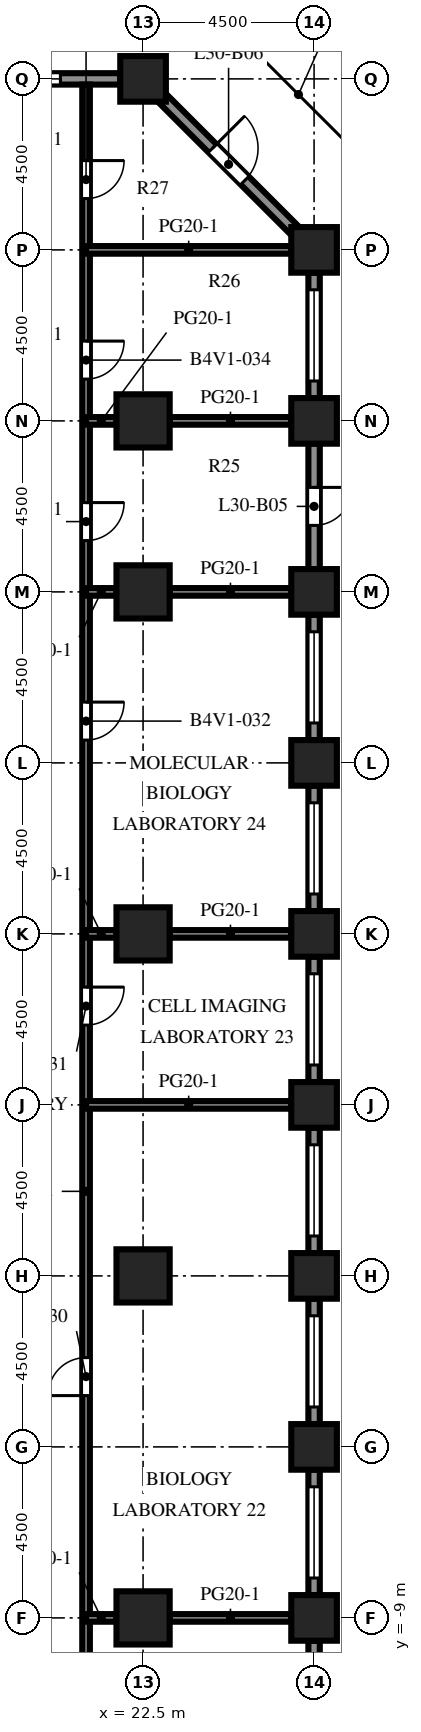
"""IFC4 building model, lengths in metres.
Left out: names, types, materials, properties, quantities, classifications, styles, units other than length and angle.
Written with IfcOpenShell. Run it as: python <this file> out.ifc"""

import sys

from ifc_helpers import new_model, si_unit, direction, frame, frame_2d, origin, origin_2d, place, context, subcontext, project, spatial, rectangle, extrude, element, fill, save


model = new_model("IFC4")
c1 = context("Model", 3, precision=1e-05, world=origin(), true_north=direction((0.0, 1.0)))
c2 = subcontext(c1, "Body", "Model", "MODEL_VIEW")
j1 = project(units=[si_unit("LENGTHUNIT", "METRE"), si_unit("PLANEANGLEUNIT", "RADIAN")], contexts=[c1])
p1 = place(None, origin())
s1 = spatial("IfcSite", under=j1, at=p1, CompositionType="ELEMENT")
p2 = place(p1, origin())
s2 = spatial("IfcBuilding", under=s1, at=p2, CompositionType="ELEMENT")
p3 = place(p2, frame((0.0, 0.0, 133.1)))
s3 = spatial("IfcBuildingStorey", under=s2, at=p3, CompositionType="ELEMENT", Elevation=133.1)
for number, where, z_axis, x_axis in (
    (1, (22.5, 31.5, 0.0), (0.0, 0.0, 1.0), (1.0, 0.0, 0.0)),
    (2, (27.0, -9.0, 0.0), (0.0, 0.0, 1.0), (1.0, 0.0, 0.0)),
    (3, (27.0, -4.5, 0.0), (0.0, 0.0, 1.0), (1.0, 0.0, 0.0)),
    (4, (27.0, 0.0, 0.0), (0.0, 0.0, 1.0), (1.0, 0.0, 0.0)),
    (5, (27.0, 4.5, 0.0), (0.0, 0.0, 1.0), (1.0, 0.0, 0.0)),
    (6, (27.0, 9.0, 0.0), (0.0, 0.0, 1.0), (1.0, 0.0, 0.0)),
    (7, (27.0, 13.5, 0.0), (0.0, 0.0, 1.0), (1.0, 0.0, 0.0)),
    (8, (27.0, 18.0, 0.0), (0.0, 0.0, 1.0), (1.0, 0.0, 0.0)),
    (9, (27.0, 22.5, 0.0), (0.0, 0.0, 1.0), (1.0, 0.0, 0.0)),
    (10, (27.0, 27.0, 0.0), (0.0, 0.0, 1.0), (1.0, 0.0, 0.0)),
):
    element("IfcColumn", number, at=place(p3, frame(where, z_axis=z_axis, x_axis=x_axis)), inside=s3, PredefinedType="COLUMN", context=c2, shape_type="SweptSolid", body=[
        extrude(rectangle(XDim=1.2, YDim=1.2, at=origin_2d()), origin(), (0.0, 0.0, 1.0), 4.1),
    ])
for number, where, z_axis, x_axis in (
    (11, (22.5, -9.0, 0.0), (0.0, 0.0, 1.0), (1.0, 0.0, 0.0)),
    (12, (22.5, 0.0, 0.0), (0.0, 0.0, 1.0), (1.0, 0.0, 0.0)),
    (13, (22.5, 9.0, 0.0), (0.0, 0.0, 1.0), (1.0, 0.0, 0.0)),
    (14, (22.5, 18.0, 0.0), (0.0, 0.0, 1.0), (1.0, 0.0, 0.0)),
    (15, (22.5, 22.5, 0.0), (0.0, 0.0, 1.0), (1.0, 0.0, 0.0)),
):
    element("IfcColumn", number, at=place(p3, frame(where, z_axis=z_axis, x_axis=x_axis)), inside=s3, PredefinedType="COLUMN", context=c2, shape_type="SweptSolid", body=[
        extrude(rectangle(XDim=1.4, YDim=1.4, at=origin_2d()), origin(), (0.0, 0.0, 1.0), 4.1),
    ])
p4 = place(p3, frame((27.0, -9.6, 0.0), z_axis=(0.0, 0.0, 1.0), x_axis=(0.0, -1.0, 0.0)))
e16 = element("IfcWall", 16, at=p4, inside=s3, PredefinedType="SOLIDWALL", context=c2, shape_type="SweptSolid", body=[
    extrude(rectangle(XDim=3.3, YDim=0.3, at=frame_2d((1.65, 0.0))), origin(), (0.0, 0.0, 1.0), 2.75),
])
p5 = place(p4, frame((1.15, 0.0, 0.0)))
e17 = element("IfcOpeningElement", 17, at=p5, cuts=e16, PredefinedType="OPENING", context=c2, shape_type="SweptSolid", body=[
    extrude(rectangle(XDim=1.0, YDim=2.2, at=frame_2d((0.5, 1.1))), frame((0.0, 0.16, 0.0), z_axis=(0.0, -1.0, 0.0), x_axis=(1.0, 0.0, 0.0)), (0.0, 0.0, 1.0), 0.32),
])
p6 = place(p3, frame((27.0, -5.1, 0.0), z_axis=(0.0, 0.0, 1.0), x_axis=(0.0, -1.0, 0.0)))
e18 = element("IfcWall", 18, at=p6, inside=s3, PredefinedType="SOLIDWALL", context=c2, shape_type="SweptSolid", body=[
    extrude(rectangle(XDim=3.3, YDim=0.3, at=frame_2d((1.65, 0.0))), origin(), (0.0, 0.0, 1.0), 2.75),
])
p7 = place(p6, frame((0.45, 0.0, 0.8)))
e19 = element("IfcOpeningElement", 19, at=p7, cuts=e18, PredefinedType="OPENING", context=c2, shape_type="SweptSolid", body=[
    extrude(rectangle(XDim=2.4, YDim=1.7, at=frame_2d((1.2, 0.85))), frame((0.0, 0.16, 0.0), z_axis=(0.0, -1.0, 0.0), x_axis=(1.0, 0.0, 0.0)), (0.0, 0.0, 1.0), 0.32),
])
p8 = place(p3, frame((27.0, -0.6, 0.0), z_axis=(0.0, 0.0, 1.0), x_axis=(0.0, -1.0, 0.0)))
e20 = element("IfcWall", 20, at=p8, inside=s3, PredefinedType="SOLIDWALL", context=c2, shape_type="SweptSolid", body=[
    extrude(rectangle(XDim=3.3, YDim=0.3, at=frame_2d((1.65, 0.0))), origin(), (0.0, 0.0, 1.0), 2.75),
])
p9 = place(p8, frame((0.45, 0.0, 0.8)))
e21 = element("IfcOpeningElement", 21, at=p9, cuts=e20, PredefinedType="OPENING", context=c2, shape_type="SweptSolid", body=[
    extrude(rectangle(XDim=2.4, YDim=1.7, at=frame_2d((1.2, 0.85))), frame((0.0, 0.16, 0.0), z_axis=(0.0, -1.0, 0.0), x_axis=(1.0, 0.0, 0.0)), (0.0, 0.0, 1.0), 0.32),
])
p10 = place(p3, frame((27.0, 3.9, 0.0), z_axis=(0.0, 0.0, 1.0), x_axis=(0.0, -1.0, 0.0)))
e22 = element("IfcWall", 22, at=p10, inside=s3, PredefinedType="SOLIDWALL", context=c2, shape_type="SweptSolid", body=[
    extrude(rectangle(XDim=3.3, YDim=0.3, at=frame_2d((1.65, 0.0))), origin(), (0.0, 0.0, 1.0), 2.75),
])
p11 = place(p10, frame((0.45, 0.0, 0.8)))
e23 = element("IfcOpeningElement", 23, at=p11, cuts=e22, PredefinedType="OPENING", context=c2, shape_type="SweptSolid", body=[
    extrude(rectangle(XDim=2.4, YDim=1.7, at=frame_2d((1.2, 0.85))), frame((0.0, 0.16, 0.0), z_axis=(0.0, -1.0, 0.0), x_axis=(1.0, 0.0, 0.0)), (0.0, 0.0, 1.0), 0.32),
])
p12 = place(p3, frame((27.0, 8.4, 0.0), z_axis=(0.0, 0.0, 1.0), x_axis=(0.0, -1.0, 0.0)))
e24 = element("IfcWall", 24, at=p12, inside=s3, PredefinedType="SOLIDWALL", context=c2, shape_type="SweptSolid", body=[
    extrude(rectangle(XDim=3.3, YDim=0.3, at=frame_2d((1.65, 0.0))), origin(), (0.0, 0.0, 1.0), 2.75),
])
p13 = place(p12, frame((0.45, 0.0, 0.8)))
e25 = element("IfcOpeningElement", 25, at=p13, cuts=e24, PredefinedType="OPENING", context=c2, shape_type="SweptSolid", body=[
    extrude(rectangle(XDim=2.4, YDim=1.7, at=frame_2d((1.2, 0.85))), frame((0.0, 0.16, 0.0), z_axis=(0.0, -1.0, 0.0), x_axis=(1.0, 0.0, 0.0)), (0.0, 0.0, 1.0), 0.32),
])
p14 = place(p3, frame((27.0, 12.9, 0.0), z_axis=(0.0, 0.0, 1.0), x_axis=(0.0, -1.0, 0.0)))
e26 = element("IfcWall", 26, at=p14, inside=s3, PredefinedType="SOLIDWALL", context=c2, shape_type="SweptSolid", body=[
    extrude(rectangle(XDim=3.3, YDim=0.3, at=frame_2d((1.65, 0.0))), origin(), (0.0, 0.0, 1.0), 2.75),
])
p15 = place(p14, frame((0.45, 0.0, 0.8)))
e27 = element("IfcOpeningElement", 27, at=p15, cuts=e26, PredefinedType="OPENING", context=c2, shape_type="SweptSolid", body=[
    extrude(rectangle(XDim=2.4, YDim=1.7, at=frame_2d((1.2, 0.85))), frame((0.0, 0.16, 0.0), z_axis=(0.0, -1.0, 0.0), x_axis=(1.0, 0.0, 0.0)), (0.0, 0.0, 1.0), 0.32),
])
p16 = place(p3, frame((27.0, 17.4, 0.0), z_axis=(0.0, 0.0, 1.0), x_axis=(0.0, -1.0, 0.0)))
e28 = element("IfcWall", 28, at=p16, inside=s3, PredefinedType="SOLIDWALL", context=c2, shape_type="SweptSolid", body=[
    extrude(rectangle(XDim=3.3, YDim=0.3, at=frame_2d((1.65, 0.0))), origin(), (0.0, 0.0, 1.0), 2.75),
])
p17 = place(p16, frame((0.45, 0.0, 0.8)))
e29 = element("IfcOpeningElement", 29, at=p17, cuts=e28, PredefinedType="OPENING", context=c2, shape_type="SweptSolid", body=[
    extrude(rectangle(XDim=2.4, YDim=1.7, at=frame_2d((1.2, 0.85))), frame((0.0, 0.16, 0.0), z_axis=(0.0, -1.0, 0.0), x_axis=(1.0, 0.0, 0.0)), (0.0, 0.0, 1.0), 0.32),
])
p18 = place(p3, frame((27.0, 21.9, 0.0), z_axis=(0.0, 0.0, 1.0), x_axis=(0.0, -1.0, 0.0)))
e30 = element("IfcWall", 30, at=p18, inside=s3, PredefinedType="SOLIDWALL", context=c2, shape_type="SweptSolid", body=[
    extrude(rectangle(XDim=3.3, YDim=0.3, at=frame_2d((1.65, 0.0))), origin(), (0.0, 0.0, 1.0), 2.75),
])
p19 = place(p18, frame((1.15, 0.0, 0.0)))
e31 = element("IfcOpeningElement", 31, at=p19, cuts=e30, PredefinedType="OPENING", context=c2, shape_type="SweptSolid", body=[
    extrude(rectangle(XDim=1.0, YDim=2.2, at=frame_2d((0.5, 1.1))), frame((0.0, 0.16, 0.0), z_axis=(0.0, -1.0, 0.0), x_axis=(1.0, 0.0, 0.0)), (0.0, 0.0, 1.0), 0.32),
])
p20 = place(p3, frame((27.0, 26.4, 0.0), z_axis=(0.0, 0.0, 1.0), x_axis=(0.0, -1.0, 0.0)))
e32 = element("IfcWall", 32, at=p20, inside=s3, PredefinedType="SOLIDWALL", context=c2, shape_type="SweptSolid", body=[
    extrude(rectangle(XDim=3.3, YDim=0.3, at=frame_2d((1.65, 0.0))), origin(), (0.0, 0.0, 1.0), 2.75),
])
p21 = place(p20, frame((0.45, 0.0, 0.8)))
e33 = element("IfcOpeningElement", 33, at=p21, cuts=e32, PredefinedType="OPENING", context=c2, shape_type="SweptSolid", body=[
    extrude(rectangle(XDim=2.4, YDim=1.7, at=frame_2d((1.2, 0.85))), frame((0.0, 0.16, 0.0), z_axis=(0.0, -1.0, 0.0), x_axis=(1.0, 0.0, 0.0)), (0.0, 0.0, 1.0), 0.32),
])
p22 = place(p3, frame((22.994, 31.006, 0.0), z_axis=(0.0, 0.0, 1.0), x_axis=(0.707106781187, -0.707106781187, 0.0)))
e34 = element("IfcWall", 34, at=p22, inside=s3, PredefinedType="SOLIDWALL", context=c2, shape_type="SweptSolid", body=[
    extrude(rectangle(XDim=4.967, YDim=0.3, at=frame_2d((2.483, 0.0))), origin(), (0.0, 0.0, 1.0), 2.75),
])
p23 = place(p22, frame((1.884, 0.0, 0.0)))
e35 = element("IfcOpeningElement", 35, at=p23, cuts=e34, PredefinedType="OPENING", context=c2, shape_type="SweptSolid", body=[
    extrude(rectangle(XDim=1.2, YDim=2.2, at=frame_2d((0.6, 1.1))), frame((0.0, 0.16, 0.0), z_axis=(0.0, -1.0, 0.0), x_axis=(1.0, 0.0, 0.0)), (0.0, 0.0, 1.0), 0.32),
])
p24 = place(p3, frame((18.6, 31.5, 0.0), z_axis=(0.0, 0.0, 1.0), x_axis=(1.0, 0.0, 0.0)))
e36 = element("IfcWall", 36, at=p24, inside=s3, PredefinedType="SOLIDWALL", context=c2, shape_type="SweptSolid", body=[
    extrude(rectangle(XDim=3.3, YDim=0.3, at=frame_2d((1.65, 0.0))), origin(), (0.0, 0.0, 1.0), 2.75),
])
p25 = place(p24, frame((0.525, 0.0, 0.8)))
e37 = element("IfcOpeningElement", 37, at=p25, cuts=e36, PredefinedType="OPENING", context=c2, shape_type="SweptSolid", body=[
    extrude(rectangle(XDim=1.2, YDim=1.7, at=frame_2d((0.6, 0.85))), frame((0.0, 0.16, 0.0), z_axis=(0.0, -1.0, 0.0), x_axis=(1.0, 0.0, 0.0)), (0.0, 0.0, 1.0), 0.32),
])
p26 = place(p3, frame((21.0, 31.35, 0.0), z_axis=(0.0, 0.0, 1.0), x_axis=(0.0, -1.0, 0.0)))
e38 = element("IfcWall", 38, at=p26, inside=s3, PredefinedType="PARTITIONING", context=c2, shape_type="SweptSolid", body=[
    extrude(rectangle(XDim=53.7, YDim=0.2, at=frame_2d((26.85, 0.0))), origin(), (0.0, 0.0, 1.0), 3.65),
])
p27 = place(p26, frame((47.5, 0.0, 0.0)))
e39 = element("IfcOpeningElement", 39, at=p27, cuts=e38, PredefinedType="OPENING", context=c2, shape_type="SweptSolid", body=[
    extrude(rectangle(XDim=1.0, YDim=2.1, at=frame_2d((0.5, 1.05))), frame((0.0, 0.11, 0.0), z_axis=(0.0, -1.0, 0.0), x_axis=(1.0, 0.0, 0.0)), (0.0, 0.0, 1.0), 0.22),
])
p28 = place(p26, frame((41.5, 0.0, 0.0)))
e40 = element("IfcOpeningElement", 40, at=p28, cuts=e38, PredefinedType="OPENING", context=c2, shape_type="SweptSolid", body=[
    extrude(rectangle(XDim=1.0, YDim=2.1, at=frame_2d((0.5, 1.05))), frame((0.0, 0.11, 0.0), z_axis=(0.0, -1.0, 0.0), x_axis=(1.0, 0.0, 0.0)), (0.0, 0.0, 1.0), 0.22),
])
p29 = place(p26, frame((33.5, 0.0, 0.0)))
e41 = element("IfcOpeningElement", 41, at=p29, cuts=e38, PredefinedType="OPENING", context=c2, shape_type="SweptSolid", body=[
    extrude(rectangle(XDim=1.0, YDim=2.1, at=frame_2d((0.5, 1.05))), frame((0.0, 0.11, 0.0), z_axis=(0.0, -1.0, 0.0), x_axis=(1.0, 0.0, 0.0)), (0.0, 0.0, 1.0), 0.22),
])
p30 = place(p26, frame((23.75, 0.0, 0.0)))
e42 = element("IfcOpeningElement", 42, at=p30, cuts=e38, PredefinedType="OPENING", context=c2, shape_type="SweptSolid", body=[
    extrude(rectangle(XDim=1.0, YDim=2.1, at=frame_2d((0.5, 1.05))), frame((0.0, 0.11, 0.0), z_axis=(0.0, -1.0, 0.0), x_axis=(1.0, 0.0, 0.0)), (0.0, 0.0, 1.0), 0.22),
])
p31 = place(p26, frame((16.25, 0.0, 0.0)))
e43 = element("IfcOpeningElement", 43, at=p31, cuts=e38, PredefinedType="OPENING", context=c2, shape_type="SweptSolid", body=[
    extrude(rectangle(XDim=1.0, YDim=2.1, at=frame_2d((0.5, 1.05))), frame((0.0, 0.11, 0.0), z_axis=(0.0, -1.0, 0.0), x_axis=(1.0, 0.0, 0.0)), (0.0, 0.0, 1.0), 0.22),
])
p32 = place(p26, frame((11.0, 0.0, 0.0)))
e44 = element("IfcOpeningElement", 44, at=p32, cuts=e38, PredefinedType="OPENING", context=c2, shape_type="SweptSolid", body=[
    extrude(rectangle(XDim=1.0, YDim=2.1, at=frame_2d((0.5, 1.05))), frame((0.0, 0.11, 0.0), z_axis=(0.0, -1.0, 0.0), x_axis=(1.0, 0.0, 0.0)), (0.0, 0.0, 1.0), 0.22),
])
p33 = place(p26, frame((6.75, 0.0, 0.0)))
e45 = element("IfcOpeningElement", 45, at=p33, cuts=e38, PredefinedType="OPENING", context=c2, shape_type="SweptSolid", body=[
    extrude(rectangle(XDim=1.0, YDim=2.1, at=frame_2d((0.5, 1.05))), frame((0.0, 0.11, 0.0), z_axis=(0.0, -1.0, 0.0), x_axis=(1.0, 0.0, 0.0)), (0.0, 0.0, 1.0), 0.22),
])
p34 = place(p26, frame((2.0, 0.0, 0.0)))
e46 = element("IfcOpeningElement", 46, at=p34, cuts=e38, PredefinedType="OPENING", context=c2, shape_type="SweptSolid", body=[
    extrude(rectangle(XDim=1.0, YDim=2.1, at=frame_2d((0.5, 1.05))), frame((0.0, 0.11, 0.0), z_axis=(0.0, -1.0, 0.0), x_axis=(1.0, 0.0, 0.0)), (0.0, 0.0, 1.0), 0.22),
])
p35 = place(p3, frame((21.0, -9.0, 0.0), z_axis=(0.0, 0.0, 1.0), x_axis=(1.0, 0.0, 0.0)))
e47 = element("IfcWall", 47, at=p35, inside=s3, PredefinedType="PARTITIONING", context=c2, shape_type="SweptSolid", body=[
    extrude(rectangle(XDim=0.8, YDim=0.2, at=frame_2d((0.4, 0.0))), origin(), (0.0, 0.0, 1.0), 3.65),
])
p36 = place(p3, frame((23.2, -9.0, 0.0), z_axis=(0.0, 0.0, 1.0), x_axis=(1.0, 0.0, 0.0)))
e48 = element("IfcWall", 48, at=p36, inside=s3, PredefinedType="PARTITIONING", context=c2, shape_type="SweptSolid", body=[
    extrude(rectangle(XDim=3.2, YDim=0.2, at=frame_2d((1.6, 0.0))), origin(), (0.0, 0.0, 1.0), 3.65),
])
p37 = place(p3, frame((21.0, 4.5, 0.0), z_axis=(0.0, 0.0, 1.0), x_axis=(1.0, 0.0, 0.0)))
e49 = element("IfcWall", 49, at=p37, inside=s3, PredefinedType="PARTITIONING", context=c2, shape_type="SweptSolid", body=[
    extrude(rectangle(XDim=5.4, YDim=0.2, at=frame_2d((2.7, 0.0))), origin(), (0.0, 0.0, 1.0), 3.65),
])
p38 = place(p3, frame((21.0, 9.0, 0.0), z_axis=(0.0, 0.0, 1.0), x_axis=(1.0, 0.0, 0.0)))
e50 = element("IfcWall", 50, at=p38, inside=s3, PredefinedType="PARTITIONING", context=c2, shape_type="SweptSolid", body=[
    extrude(rectangle(XDim=0.8, YDim=0.2, at=frame_2d((0.4, 0.0))), origin(), (0.0, 0.0, 1.0), 3.65),
])
p39 = place(p3, frame((23.2, 9.0, 0.0), z_axis=(0.0, 0.0, 1.0), x_axis=(1.0, 0.0, 0.0)))
e51 = element("IfcWall", 51, at=p39, inside=s3, PredefinedType="PARTITIONING", context=c2, shape_type="SweptSolid", body=[
    extrude(rectangle(XDim=3.2, YDim=0.2, at=frame_2d((1.6, 0.0))), origin(), (0.0, 0.0, 1.0), 3.65),
])
p40 = place(p3, frame((21.0, 18.0, 0.0), z_axis=(0.0, 0.0, 1.0), x_axis=(1.0, 0.0, 0.0)))
e52 = element("IfcWall", 52, at=p40, inside=s3, PredefinedType="PARTITIONING", context=c2, shape_type="SweptSolid", body=[
    extrude(rectangle(XDim=0.8, YDim=0.2, at=frame_2d((0.4, 0.0))), origin(), (0.0, 0.0, 1.0), 3.65),
])
p41 = place(p3, frame((23.2, 18.0, 0.0), z_axis=(0.0, 0.0, 1.0), x_axis=(1.0, 0.0, 0.0)))
e53 = element("IfcWall", 53, at=p41, inside=s3, PredefinedType="PARTITIONING", context=c2, shape_type="SweptSolid", body=[
    extrude(rectangle(XDim=3.2, YDim=0.2, at=frame_2d((1.6, 0.0))), origin(), (0.0, 0.0, 1.0), 3.65),
])
p42 = place(p3, frame((21.0, 22.5, 0.0), z_axis=(0.0, 0.0, 1.0), x_axis=(1.0, 0.0, 0.0)))
e54 = element("IfcWall", 54, at=p42, inside=s3, PredefinedType="PARTITIONING", context=c2, shape_type="SweptSolid", body=[
    extrude(rectangle(XDim=0.8, YDim=0.2, at=frame_2d((0.4, 0.0))), origin(), (0.0, 0.0, 1.0), 3.65),
])
p43 = place(p3, frame((23.2, 22.5, 0.0), z_axis=(0.0, 0.0, 1.0), x_axis=(1.0, 0.0, 0.0)))
e55 = element("IfcWall", 55, at=p43, inside=s3, PredefinedType="PARTITIONING", context=c2, shape_type="SweptSolid", body=[
    extrude(rectangle(XDim=3.2, YDim=0.2, at=frame_2d((1.6, 0.0))), origin(), (0.0, 0.0, 1.0), 3.65),
])
p44 = place(p3, frame((21.0, 27.0, 0.0), z_axis=(0.0, 0.0, 1.0), x_axis=(1.0, 0.0, 0.0)))
e56 = element("IfcWall", 56, at=p44, inside=s3, PredefinedType="PARTITIONING", context=c2, shape_type="SweptSolid", body=[
    extrude(rectangle(XDim=5.4, YDim=0.2, at=frame_2d((2.7, 0.0))), origin(), (0.0, 0.0, 1.0), 3.65),
])
p45 = place(p7, origin())
e57 = element("IfcWindow", 57, at=p45, inside=s3, PartitioningType="SINGLE_PANEL", PredefinedType="WINDOW", context=c2, shape_type="SweptSolid", body=[
    extrude(rectangle(XDim=2.4, YDim=1.7, at=frame_2d((1.2, 0.85))), frame((0.0, 0.03, 0.0), z_axis=(0.0, -1.0, 0.0), x_axis=(1.0, 0.0, 0.0)), (0.0, 0.0, 1.0), 0.06),
])
fill(e19, e57)
p46 = place(p9, origin())
e58 = element("IfcWindow", 58, at=p46, inside=s3, PartitioningType="SINGLE_PANEL", PredefinedType="WINDOW", context=c2, shape_type="SweptSolid", body=[
    extrude(rectangle(XDim=2.4, YDim=1.7, at=frame_2d((1.2, 0.85))), frame((0.0, 0.03, 0.0), z_axis=(0.0, -1.0, 0.0), x_axis=(1.0, 0.0, 0.0)), (0.0, 0.0, 1.0), 0.06),
])
fill(e21, e58)
p47 = place(p11, origin())
e59 = element("IfcWindow", 59, at=p47, inside=s3, PartitioningType="SINGLE_PANEL", PredefinedType="WINDOW", context=c2, shape_type="SweptSolid", body=[
    extrude(rectangle(XDim=2.4, YDim=1.7, at=frame_2d((1.2, 0.85))), frame((0.0, 0.03, 0.0), z_axis=(0.0, -1.0, 0.0), x_axis=(1.0, 0.0, 0.0)), (0.0, 0.0, 1.0), 0.06),
])
fill(e23, e59)
p48 = place(p13, origin())
e60 = element("IfcWindow", 60, at=p48, inside=s3, PartitioningType="SINGLE_PANEL", PredefinedType="WINDOW", context=c2, shape_type="SweptSolid", body=[
    extrude(rectangle(XDim=2.4, YDim=1.7, at=frame_2d((1.2, 0.85))), frame((0.0, 0.03, 0.0), z_axis=(0.0, -1.0, 0.0), x_axis=(1.0, 0.0, 0.0)), (0.0, 0.0, 1.0), 0.06),
])
fill(e25, e60)
p49 = place(p15, origin())
e61 = element("IfcWindow", 61, at=p49, inside=s3, PartitioningType="SINGLE_PANEL", PredefinedType="WINDOW", context=c2, shape_type="SweptSolid", body=[
    extrude(rectangle(XDim=2.4, YDim=1.7, at=frame_2d((1.2, 0.85))), frame((0.0, 0.03, 0.0), z_axis=(0.0, -1.0, 0.0), x_axis=(1.0, 0.0, 0.0)), (0.0, 0.0, 1.0), 0.06),
])
fill(e27, e61)
p50 = place(p17, origin())
e62 = element("IfcWindow", 62, at=p50, inside=s3, PartitioningType="SINGLE_PANEL", PredefinedType="WINDOW", context=c2, shape_type="SweptSolid", body=[
    extrude(rectangle(XDim=2.4, YDim=1.7, at=frame_2d((1.2, 0.85))), frame((0.0, 0.03, 0.0), z_axis=(0.0, -1.0, 0.0), x_axis=(1.0, 0.0, 0.0)), (0.0, 0.0, 1.0), 0.06),
])
fill(e29, e62)
p51 = place(p19, origin())
e63 = element("IfcDoor", 63, at=p51, inside=s3, OperationType="SINGLE_SWING_LEFT", PredefinedType="DOOR", context=c2, shape_type="SweptSolid", body=[
    extrude(rectangle(XDim=1.0, YDim=2.2, at=frame_2d((0.5, 1.1))), frame((0.0, 0.025, 0.0), z_axis=(0.0, -1.0, 0.0), x_axis=(1.0, 0.0, 0.0)), (0.0, 0.0, 1.0), 0.05),
])
fill(e31, e63)
p52 = place(p21, origin())
e64 = element("IfcWindow", 64, at=p52, inside=s3, PartitioningType="SINGLE_PANEL", PredefinedType="WINDOW", context=c2, shape_type="SweptSolid", body=[
    extrude(rectangle(XDim=2.4, YDim=1.7, at=frame_2d((1.2, 0.85))), frame((0.0, 0.03, 0.0), z_axis=(0.0, -1.0, 0.0), x_axis=(1.0, 0.0, 0.0)), (0.0, 0.0, 1.0), 0.06),
])
fill(e33, e64)
p53 = place(p23, origin())
e65 = element("IfcDoor", 65, at=p53, inside=s3, OperationType="SINGLE_SWING_LEFT", PredefinedType="DOOR", context=c2, shape_type="SweptSolid", body=[
    extrude(rectangle(XDim=1.2, YDim=2.2, at=frame_2d((0.6, 1.1))), frame((0.0, 0.025, 0.0), z_axis=(0.0, -1.0, 0.0), x_axis=(1.0, 0.0, 0.0)), (0.0, 0.0, 1.0), 0.05),
])
fill(e35, e65)
p54 = place(p25, origin())
e66 = element("IfcWindow", 66, at=p54, inside=s3, PartitioningType="SINGLE_PANEL", PredefinedType="WINDOW", context=c2, shape_type="SweptSolid", body=[
    extrude(rectangle(XDim=1.2, YDim=1.7, at=frame_2d((0.6, 0.85))), frame((0.0, 0.03, 0.0), z_axis=(0.0, -1.0, 0.0), x_axis=(1.0, 0.0, 0.0)), (0.0, 0.0, 1.0), 0.06),
])
fill(e37, e66)
p55 = place(p29, origin())
e67 = element("IfcDoor", 67, at=p55, inside=s3, OperationType="SINGLE_SWING_RIGHT", PredefinedType="DOOR", context=c2, shape_type="SweptSolid", body=[
    extrude(rectangle(XDim=1.0, YDim=2.1, at=frame_2d((0.5, 1.05))), frame((0.0, 0.025, 0.0), z_axis=(0.0, -1.0, 0.0), x_axis=(1.0, 0.0, 0.0)), (0.0, 0.0, 1.0), 0.05),
])
fill(e41, e67)
p56 = place(p30, origin())
e68 = element("IfcDoor", 68, at=p56, inside=s3, OperationType="SINGLE_SWING_LEFT", PredefinedType="DOOR", context=c2, shape_type="SweptSolid", body=[
    extrude(rectangle(XDim=1.0, YDim=2.1, at=frame_2d((0.5, 1.05))), frame((0.0, 0.025, 0.0), z_axis=(0.0, -1.0, 0.0), x_axis=(1.0, 0.0, 0.0)), (0.0, 0.0, 1.0), 0.05),
])
fill(e42, e68)
p57 = place(p31, origin())
e69 = element("IfcDoor", 69, at=p57, inside=s3, OperationType="SINGLE_SWING_LEFT", PredefinedType="DOOR", context=c2, shape_type="SweptSolid", body=[
    extrude(rectangle(XDim=1.0, YDim=2.1, at=frame_2d((0.5, 1.05))), frame((0.0, 0.025, 0.0), z_axis=(0.0, -1.0, 0.0), x_axis=(1.0, 0.0, 0.0)), (0.0, 0.0, 1.0), 0.05),
])
fill(e43, e69)
p58 = place(p32, origin())
e70 = element("IfcDoor", 70, at=p58, inside=s3, OperationType="SINGLE_SWING_LEFT", PredefinedType="DOOR", context=c2, shape_type="SweptSolid", body=[
    extrude(rectangle(XDim=1.0, YDim=2.1, at=frame_2d((0.5, 1.05))), frame((0.0, 0.025, 0.0), z_axis=(0.0, -1.0, 0.0), x_axis=(1.0, 0.0, 0.0)), (0.0, 0.0, 1.0), 0.05),
])
fill(e44, e70)
p59 = place(p33, origin())
e71 = element("IfcDoor", 71, at=p59, inside=s3, OperationType="SINGLE_SWING_LEFT", PredefinedType="DOOR", context=c2, shape_type="SweptSolid", body=[
    extrude(rectangle(XDim=1.0, YDim=2.1, at=frame_2d((0.5, 1.05))), frame((0.0, 0.025, 0.0), z_axis=(0.0, -1.0, 0.0), x_axis=(1.0, 0.0, 0.0)), (0.0, 0.0, 1.0), 0.05),
])
fill(e45, e71)
p60 = place(p34, origin())
e72 = element("IfcDoor", 72, at=p60, inside=s3, OperationType="SINGLE_SWING_LEFT", PredefinedType="DOOR", context=c2, shape_type="SweptSolid", body=[
    extrude(rectangle(XDim=1.0, YDim=2.1, at=frame_2d((0.5, 1.05))), frame((0.0, 0.025, 0.0), z_axis=(0.0, -1.0, 0.0), x_axis=(1.0, 0.0, 0.0)), (0.0, 0.0, 1.0), 0.05),
])
fill(e46, e72)
save(model, sys.argv[1])
